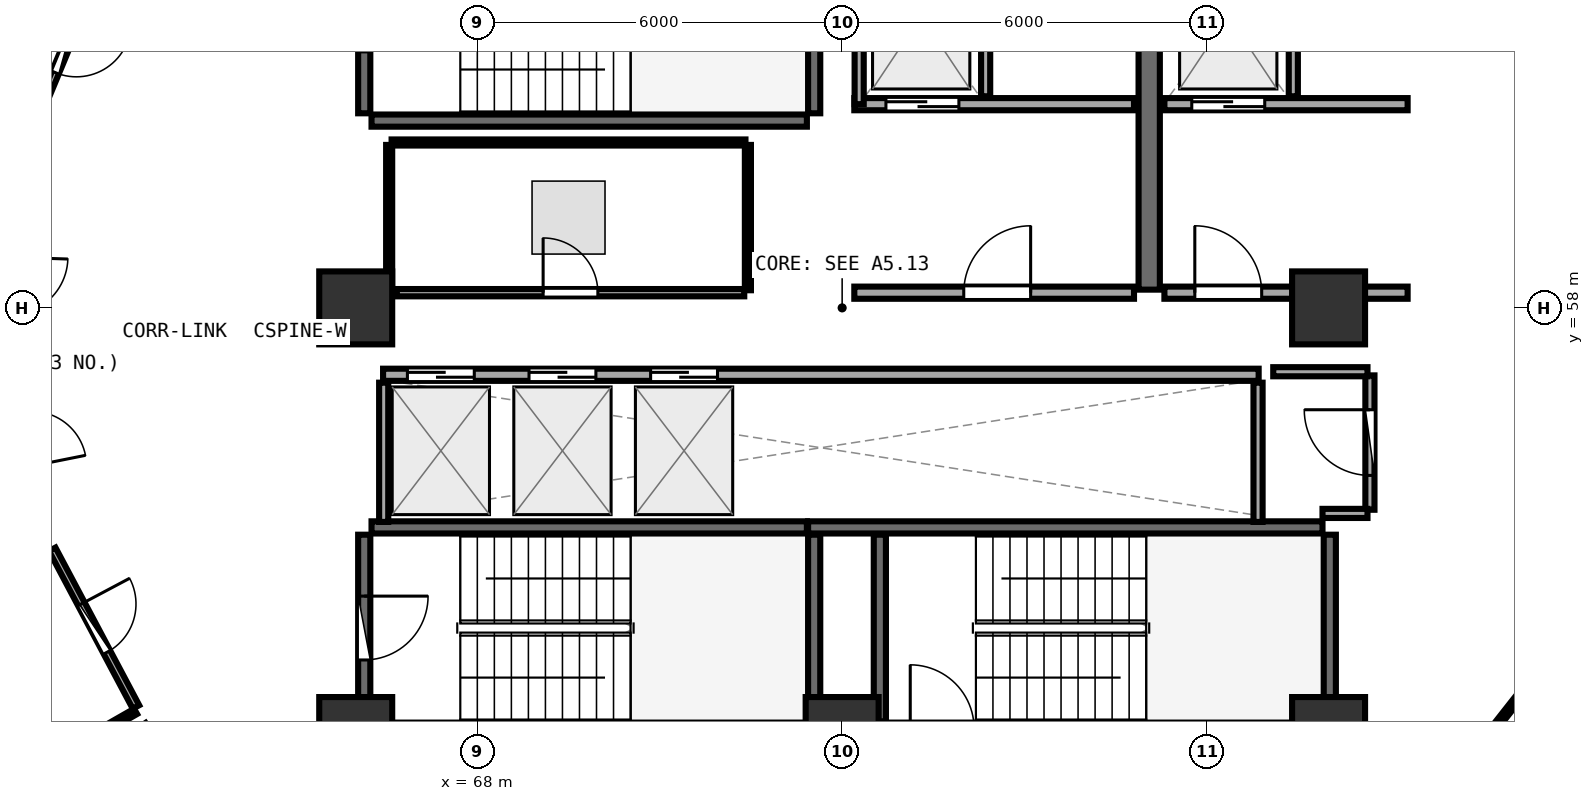
"""IFC4 building model, lengths in metres.
Left out: names, types, materials, properties, quantities, classifications, styles, units other than length and angle.
Written with IfcOpenShell. Run it as: python <this file> out.ifc"""

import sys

from ifc_helpers import new_model, si_unit, direction, frame, frame_2d, origin, origin_2d, place, context, subcontext, project, spatial, rectangle, extrude, element, fill, save


model = new_model("IFC4")
c1 = context("Model", 3, precision=1e-05, world=origin(), true_north=direction((0.0, 1.0)))
c2 = subcontext(c1, "Body", "Model", "MODEL_VIEW")
j1 = project(units=[si_unit("LENGTHUNIT", "METRE"), si_unit("PLANEANGLEUNIT", "RADIAN")], contexts=[c1])
p1 = place(None, origin())
s1 = spatial("IfcSite", under=j1, at=p1, CompositionType="ELEMENT")
p2 = place(p1, origin())
s2 = spatial("IfcBuilding", under=s1, at=p2, CompositionType="ELEMENT")
p3 = place(p2, frame((0.0, 0.0, 204.45)))
s3 = spatial("IfcBuildingStorey", under=s2, at=p3, CompositionType="ELEMENT", Elevation=204.45)
for number, where, z_axis, x_axis in (
    (1, (66.0, 51.0, 0.0), (0.0, 0.0, 1.0), (1.0, 0.0, 0.0)),
    (2, (74.0, 51.0, 0.0), (0.0, 0.0, 1.0), (1.0, 0.0, 0.0)),
    (3, (82.0, 51.0, 0.0), (0.0, 0.0, 1.0), (1.0, 0.0, 0.0)),
    (4, (82.0, 58.0, 0.0), (0.0, 0.0, 1.0), (1.0, 0.0, 0.0)),
    (5, (66.0, 58.0, 0.0), (0.0, 0.0, 1.0), (1.0, 0.0, 0.0)),
):
    element("IfcColumn", number, at=place(p3, frame(where, z_axis=z_axis, x_axis=x_axis)), inside=s3, PredefinedType="PILASTER", context=c2, shape_type="SweptSolid", body=[
        extrude(rectangle(XDim=1.2, YDim=1.2, at=origin_2d()), origin(), (0.0, 0.0, 1.0), 3.75),
    ])
p4 = place(p3, frame((66.26, 61.08, 0.0), z_axis=(0.0, 0.0, 1.0), x_axis=(1.0, 0.0, 0.0)))
e6 = element("IfcWall", 6, at=p4, inside=s3, PredefinedType="SHEAR", context=c2, shape_type="SweptSolid", body=[
    extrude(rectangle(XDim=7.16, YDim=0.2, at=frame_2d((3.58, 0.0))), origin(), (0.0, 0.0, 1.0), 3.49),
])
p5 = place(p3, frame((73.54, 61.2, 0.0), z_axis=(0.0, 0.0, 1.0), x_axis=(0.0, 1.0, 0.0)))
e7 = element("IfcWall", 7, at=p5, inside=s3, PredefinedType="SHEAR", context=c2, shape_type="SweptSolid", body=[
    extrude(rectangle(XDim=3.07, YDim=0.2, at=frame_2d((1.535, 0.0))), origin(), (0.0, 0.0, 1.0), 3.49),
])
p6 = place(p3, frame((66.14, 64.27, 0.0), z_axis=(0.0, 0.0, 1.0), x_axis=(0.0, -1.0, 0.0)))
e8 = element("IfcWall", 8, at=p6, inside=s3, PredefinedType="SHEAR", context=c2, shape_type="SweptSolid", body=[
    extrude(rectangle(XDim=3.07, YDim=0.2, at=frame_2d((1.535, 0.0))), origin(), (0.0, 0.0, 1.0), 3.49),
])
p7 = place(p6, frame((1.01, 0.0, 0.0)))
e9 = element("IfcOpeningElement", 9, at=p7, cuts=e8, PredefinedType="OPENING", context=c2, shape_type="SweptSolid", body=[
    extrude(rectangle(XDim=1.05, YDim=2.1, at=frame_2d((0.525, 1.05))), frame((0.0, 0.11, 0.0), z_axis=(0.0, -1.0, 0.0), x_axis=(1.0, 0.0, 0.0)), (0.0, 0.0, 1.0), 0.22),
])
p8 = place(p3, frame((82.02, 51.2, 0.0), z_axis=(0.0, 0.0, 1.0), x_axis=(0.0, 1.0, 0.0)))
e10 = element("IfcWall", 10, at=p8, inside=s3, PredefinedType="SHEAR", context=c2, shape_type="SweptSolid", body=[
    extrude(rectangle(XDim=3.07, YDim=0.2, at=frame_2d((1.535, 0.0))), origin(), (0.0, 0.0, 1.0), 3.49),
])
p9 = place(p3, frame((81.9, 54.39, 0.0), z_axis=(0.0, 0.0, 1.0), x_axis=(-1.0, 0.0, 0.0)))
e11 = element("IfcWall", 11, at=p9, inside=s3, PredefinedType="SHEAR", context=c2, shape_type="SweptSolid", body=[
    extrude(rectangle(XDim=8.46, YDim=0.2, at=frame_2d((4.23, 0.0))), origin(), (0.0, 0.0, 1.0), 3.49),
])
for number, where, z_axis, x_axis in (
    (12, (74.62, 54.27, 0.0), (0.0, 0.0, 1.0), (0.0, -1.0, 0.0)),
    (13, (73.54, 51.2, 0.0), (0.0, 0.0, 1.0), (0.0, 1.0, 0.0)),
):
    element("IfcWall", number, at=place(p3, frame(where, z_axis=z_axis, x_axis=x_axis)), inside=s3, PredefinedType="SHEAR", context=c2, shape_type="SweptSolid", body=[
        extrude(rectangle(XDim=3.07, YDim=0.2, at=frame_2d((1.535, 0.0))), origin(), (0.0, 0.0, 1.0), 3.49),
    ])
p10 = place(p3, frame((73.42, 54.39, 0.0), z_axis=(0.0, 0.0, 1.0), x_axis=(-1.0, 0.0, 0.0)))
e14 = element("IfcWall", 14, at=p10, inside=s3, PredefinedType="SHEAR", context=c2, shape_type="SweptSolid", body=[
    extrude(rectangle(XDim=7.16, YDim=0.2, at=frame_2d((3.58, 0.0))), origin(), (0.0, 0.0, 1.0), 3.49),
])
p11 = place(p3, frame((66.14, 54.27, 0.0), z_axis=(0.0, 0.0, 1.0), x_axis=(0.0, -1.0, 0.0)))
e15 = element("IfcWall", 15, at=p11, inside=s3, PredefinedType="SHEAR", context=c2, shape_type="SweptSolid", body=[
    extrude(rectangle(XDim=3.07, YDim=0.2, at=frame_2d((1.535, 0.0))), origin(), (0.0, 0.0, 1.0), 3.49),
])
p12 = place(p11, frame((1.01, 0.0, 0.0)))
e16 = element("IfcOpeningElement", 16, at=p12, cuts=e15, PredefinedType="OPENING", context=c2, shape_type="SweptSolid", body=[
    extrude(rectangle(XDim=1.05, YDim=2.1, at=frame_2d((0.525, 1.05))), frame((0.0, 0.11, 0.0), z_axis=(0.0, -1.0, 0.0), x_axis=(1.0, 0.0, 0.0)), (0.0, 0.0, 1.0), 0.22),
])
p13 = place(p3, frame((79.05, 58.3, 0.0), z_axis=(0.0, 0.0, 1.0), x_axis=(0.0, 1.0, 0.0)))
e17 = element("IfcWall", 17, at=p13, inside=s3, PredefinedType="SHEAR", context=c2, shape_type="SweptSolid", body=[
    extrude(rectangle(XDim=6.3, YDim=0.35, at=frame_2d((3.15, 0.0))), origin(), (0.0, 0.0, 1.0), 3.49),
])
p14 = place(p3, frame((74.2, 61.35, 0.0), z_axis=(0.0, 0.0, 1.0), x_axis=(1.0, 0.0, 0.0)))
e18 = element("IfcWall", 18, at=p14, inside=s3, PredefinedType="SOLIDWALL", context=c2, shape_type="SweptSolid", body=[
    extrude(rectangle(XDim=4.6, YDim=0.2, at=frame_2d((2.3, 0.0))), origin(), (0.0, 0.0, 1.0), 3.48),
])
p15 = place(p14, frame((0.52, 0.0, 0.0)))
e19 = element("IfcOpeningElement", 19, at=p15, cuts=e18, PredefinedType="OPENING", context=c2, shape_type="SweptSolid", body=[
    extrude(rectangle(XDim=1.2, YDim=2.15, at=frame_2d((0.6, 1.075))), frame((0.0, 0.11, 0.0), z_axis=(0.0, -1.0, 0.0), x_axis=(1.0, 0.0, 0.0)), (0.0, 0.0, 1.0), 0.22),
])
p16 = place(p3, frame((74.28, 61.35, 0.0), z_axis=(0.0, 0.0, 1.0), x_axis=(0.0, 1.0, 0.0)))
e20 = element("IfcWall", 20, at=p16, inside=s3, PredefinedType="PARTITIONING", context=c2, shape_type="SweptSolid", body=[
    extrude(rectangle(XDim=2.97, YDim=0.15, at=frame_2d((1.485, 0.0))), origin(), (0.0, 0.0, 1.0), 3.48),
])
p17 = place(p3, frame((76.36, 61.48, 0.0), z_axis=(0.0, 0.0, 1.0), x_axis=(0.0, 1.0, 0.0)))
e21 = element("IfcWall", 21, at=p17, inside=s3, PredefinedType="PARTITIONING", context=c2, shape_type="SweptSolid", body=[
    extrude(rectangle(XDim=2.84, YDim=0.15, at=frame_2d((1.42, 0.0))), origin(), (0.0, 0.0, 1.0), 3.48),
])
p18 = place(p3, frame((79.3, 61.35, 0.0), z_axis=(0.0, 0.0, 1.0), x_axis=(1.0, 0.0, 0.0)))
e22 = element("IfcWall", 22, at=p18, inside=s3, PredefinedType="SOLIDWALL", context=c2, shape_type="SweptSolid", body=[
    extrude(rectangle(XDim=4.0, YDim=0.2, at=frame_2d((2.0, 0.0))), origin(), (0.0, 0.0, 1.0), 2.775),
])
p19 = place(p18, frame((0.45, 0.0, 0.0)))
e23 = element("IfcOpeningElement", 23, at=p19, cuts=e22, PredefinedType="OPENING", context=c2, shape_type="SweptSolid", body=[
    extrude(rectangle(XDim=1.2, YDim=2.15, at=frame_2d((0.6, 1.075))), frame((0.0, 0.11, 0.0), z_axis=(0.0, -1.0, 0.0), x_axis=(1.0, 0.0, 0.0)), (0.0, 0.0, 1.0), 0.22),
])
p20 = place(p3, frame((81.42, 61.48, 0.0), z_axis=(0.0, 0.0, 1.0), x_axis=(0.0, 1.0, 0.0)))
e24 = element("IfcWall", 24, at=p20, inside=s3, PredefinedType="PARTITIONING", context=c2, shape_type="SweptSolid", body=[
    extrude(rectangle(XDim=2.84, YDim=0.15, at=frame_2d((1.42, 0.0))), origin(), (0.0, 0.0, 1.0), 3.48),
])
p21 = place(p3, frame((74.2, 58.25, 0.0), z_axis=(0.0, 0.0, 1.0), x_axis=(1.0, 0.0, 0.0)))
e25 = element("IfcWall", 25, at=p21, inside=s3, PredefinedType="SOLIDWALL", context=c2, shape_type="SweptSolid", body=[
    extrude(rectangle(XDim=4.6, YDim=0.2, at=frame_2d((2.3, 0.0))), origin(), (0.0, 0.0, 1.0), 3.48),
])
p22 = place(p21, frame((1.8, 0.0, 0.0)))
e26 = element("IfcOpeningElement", 26, at=p22, cuts=e25, PredefinedType="OPENING", context=c2, shape_type="SweptSolid", body=[
    extrude(rectangle(XDim=1.1, YDim=2.1, at=frame_2d((0.55, 1.05))), frame((0.0, 0.11, 0.0), z_axis=(0.0, -1.0, 0.0), x_axis=(1.0, 0.0, 0.0)), (0.0, 0.0, 1.0), 0.22),
])
p23 = place(p3, frame((79.3, 58.25, 0.0), z_axis=(0.0, 0.0, 1.0), x_axis=(1.0, 0.0, 0.0)))
e27 = element("IfcWall", 27, at=p23, inside=s3, PredefinedType="SOLIDWALL", context=c2, shape_type="SweptSolid", body=[
    extrude(rectangle(XDim=4.0, YDim=0.2, at=frame_2d((2.0, 0.0))), origin(), (0.0, 0.0, 1.0), 2.775),
])
p24 = place(p23, frame((0.5, 0.0, 0.0)))
e28 = element("IfcOpeningElement", 28, at=p24, cuts=e27, PredefinedType="OPENING", context=c2, shape_type="SweptSolid", body=[
    extrude(rectangle(XDim=1.1, YDim=2.1, at=frame_2d((0.55, 1.05))), frame((0.0, 0.11, 0.0), z_axis=(0.0, -1.0, 0.0), x_axis=(1.0, 0.0, 0.0)), (0.0, 0.0, 1.0), 0.22),
])
p25 = place(p3, frame((66.45, 56.9, 0.0), z_axis=(0.0, 0.0, 1.0), x_axis=(1.0, 0.0, 0.0)))
e29 = element("IfcWall", 29, at=p25, inside=s3, PredefinedType="SOLIDWALL", context=c2, shape_type="SweptSolid", body=[
    extrude(rectangle(XDim=14.4, YDim=0.2, at=frame_2d((7.2, 0.0))), origin(), (0.0, 0.0, 1.0), 3.48),
])
p26 = place(p25, frame((0.4, 0.0, 0.0)))
e30 = element("IfcOpeningElement", 30, at=p26, cuts=e29, PredefinedType="OPENING", context=c2, shape_type="SweptSolid", body=[
    extrude(rectangle(XDim=1.1, YDim=2.1, at=frame_2d((0.55, 1.05))), frame((0.0, 0.11, 0.0), z_axis=(0.0, -1.0, 0.0), x_axis=(1.0, 0.0, 0.0)), (0.0, 0.0, 1.0), 0.22),
])
p27 = place(p25, frame((2.4, 0.0, 0.0)))
e31 = element("IfcOpeningElement", 31, at=p27, cuts=e29, PredefinedType="OPENING", context=c2, shape_type="SweptSolid", body=[
    extrude(rectangle(XDim=1.1, YDim=2.1, at=frame_2d((0.55, 1.05))), frame((0.0, 0.11, 0.0), z_axis=(0.0, -1.0, 0.0), x_axis=(1.0, 0.0, 0.0)), (0.0, 0.0, 1.0), 0.22),
])
p28 = place(p25, frame((4.4, 0.0, 0.0)))
e32 = element("IfcOpeningElement", 32, at=p28, cuts=e29, PredefinedType="OPENING", context=c2, shape_type="SweptSolid", body=[
    extrude(rectangle(XDim=1.1, YDim=2.1, at=frame_2d((0.55, 1.05))), frame((0.0, 0.11, 0.0), z_axis=(0.0, -1.0, 0.0), x_axis=(1.0, 0.0, 0.0)), (0.0, 0.0, 1.0), 0.22),
])
for number, where, z_axis, x_axis in (
    (33, (66.46, 54.48, 0.0), (0.0, 0.0, 1.0), (0.0, 1.0, 0.0)),
    (34, (80.84, 54.48, 0.0), (0.0, 0.0, 1.0), (0.0, 1.0, 0.0)),
):
    element("IfcWall", number, at=place(p3, frame(where, z_axis=z_axis, x_axis=x_axis)), inside=s3, PredefinedType="PARTITIONING", context=c2, shape_type="SweptSolid", body=[
        extrude(rectangle(XDim=2.29, YDim=0.15, at=frame_2d((1.145, 0.0))), origin(), (0.0, 0.0, 1.0), 3.48),
    ])
p29 = place(p3, frame((82.68, 54.68, 0.0), z_axis=(0.0, 0.0, 1.0), x_axis=(0.0, 1.0, 0.0)))
e35 = element("IfcWall", 35, at=p29, inside=s3, PredefinedType="PARTITIONING", context=c2, shape_type="SweptSolid", body=[
    extrude(rectangle(XDim=2.21, YDim=0.15, at=frame_2d((1.105, 0.0))), origin(), (0.0, 0.0, 1.0), 3.48),
])
p30 = place(p29, frame((0.565, 0.0, 0.0)))
e36 = element("IfcOpeningElement", 36, at=p30, cuts=e35, PredefinedType="OPENING", context=c2, shape_type="SweptSolid", body=[
    extrude(rectangle(XDim=1.08, YDim=2.1, at=frame_2d((0.54, 1.05))), frame((0.0, 0.085, 0.0), z_axis=(0.0, -1.0, 0.0), x_axis=(1.0, 0.0, 0.0)), (0.0, 0.0, 1.0), 0.17),
])
p31 = place(p3, frame((66.675, 58.25, 0.0), z_axis=(0.0, 0.0, 1.0), x_axis=(1.0, 0.0, 0.0)))
e37 = element("IfcWall", 37, at=p31, inside=s3, PredefinedType="PARTITIONING", context=c2, shape_type="SweptSolid", body=[
    extrude(rectangle(XDim=5.715, YDim=0.12, at=frame_2d((2.857, 0.0))), origin(), (0.0, 0.0, 1.0), 3.48),
])
p32 = place(p31, frame((2.407, 0.0, 0.0)))
e38 = element("IfcOpeningElement", 38, at=p32, cuts=e37, PredefinedType="OPENING", context=c2, shape_type="SweptSolid", body=[
    extrude(rectangle(XDim=0.9, YDim=2.08, at=frame_2d((0.45, 1.04))), frame((0.0, 0.07, 0.0), z_axis=(0.0, -1.0, 0.0), x_axis=(1.0, 0.0, 0.0)), (0.0, 0.0, 1.0), 0.14),
])
p33 = place(p3, frame((61.793, 63.629, 0.0), z_axis=(0.0, 0.0, 1.0), x_axis=(-0.384145151494, -0.923272713007, 0.0)))
e39 = element("IfcWall", 39, at=p33, inside=s3, PredefinedType="PARTITIONING", context=c2, shape_type="SweptSolid", body=[
    extrude(rectangle(XDim=2.913, YDim=0.12, at=frame_2d((1.456, 0.0))), origin(), (0.0, 0.0, 1.0), 3.235),
])
p34 = place(p33, frame((1.006, 0.0, 0.0)))
e40 = element("IfcOpeningElement", 40, at=p34, cuts=e39, PredefinedType="OPENING", context=c2, shape_type="SweptSolid", body=[
    extrude(rectangle(XDim=0.9, YDim=2.08, at=frame_2d((0.45, 1.04))), frame((0.0, 0.07, 0.0), z_axis=(0.0, -1.0, 0.0), x_axis=(1.0, 0.0, 0.0)), (0.0, 0.0, 1.0), 0.14),
])
p35 = place(p3, frame((61.009, 54.03, 0.0), z_axis=(0.0, 0.0, 1.0), x_axis=(0.468999166779, -0.883198608219, 0.0)))
e41 = element("IfcWall", 41, at=p35, inside=s3, PredefinedType="PARTITIONING", context=c2, shape_type="SweptSolid", body=[
    extrude(rectangle(XDim=2.936, YDim=0.12, at=frame_2d((1.468, 0.0))), origin(), (0.0, 0.0, 1.0), 3.235),
])
p36 = place(p35, frame((1.018, 0.0, 0.0)))
e42 = element("IfcOpeningElement", 42, at=p36, cuts=e41, PredefinedType="OPENING", context=c2, shape_type="SweptSolid", body=[
    extrude(rectangle(XDim=0.9, YDim=2.08, at=frame_2d((0.45, 1.04))), frame((0.0, 0.07, 0.0), z_axis=(0.0, -1.0, 0.0), x_axis=(1.0, 0.0, 0.0)), (0.0, 0.0, 1.0), 0.14),
])
p37 = place(p3, frame((81.9, 54.62, 0.0), z_axis=(0.0, 0.0, 1.0), x_axis=(1.0, 0.0, 0.0)))
e43 = element("IfcWall", 43, at=p37, inside=s3, PredefinedType="PARTITIONING", context=c2, shape_type="SweptSolid", body=[
    extrude(rectangle(XDim=0.74, YDim=0.15, at=frame_2d((0.37, 0.0))), origin(), (0.0, 0.0, 1.0), 2.775),
])
p38 = place(p3, frame((82.64, 56.95, 0.0), z_axis=(0.0, 0.0, 1.0), x_axis=(-1.0, 0.0, 0.0)))
e44 = element("IfcWall", 44, at=p38, inside=s3, PredefinedType="PARTITIONING", context=c2, shape_type="SweptSolid", body=[
    extrude(rectangle(XDim=1.55, YDim=0.15, at=frame_2d((0.775, 0.0))), origin(), (0.0, 0.0, 1.0), 2.775),
])
p39 = place(p3, frame((72.45, 58.29, 0.0), z_axis=(0.0, 0.0, 1.0), x_axis=(0.0, 1.0, 0.0)))
e45 = element("IfcWall", 45, at=p39, inside=s3, PredefinedType="PARTITIONING", context=c2, shape_type="SweptSolid", body=[
    extrude(rectangle(XDim=2.39, YDim=0.1, at=frame_2d((1.195, 0.0))), origin(), (0.0, 0.0, 1.0), 3.48),
])
p40 = place(p3, frame((72.41, 60.72, 0.0), z_axis=(0.0, 0.0, 1.0), x_axis=(-1.0, 0.0, 0.0)))
e46 = element("IfcWall", 46, at=p40, inside=s3, PredefinedType="PARTITIONING", context=c2, shape_type="SweptSolid", body=[
    extrude(rectangle(XDim=5.82, YDim=0.1, at=frame_2d((2.91, 0.0))), origin(), (0.0, 0.0, 1.0), 3.48),
])
p41 = place(p3, frame((66.55, 60.68, 0.0), z_axis=(0.0, 0.0, 1.0), x_axis=(0.0, -1.0, 0.0)))
e47 = element("IfcWall", 47, at=p41, inside=s3, PredefinedType="PARTITIONING", context=c2, shape_type="SweptSolid", body=[
    extrude(rectangle(XDim=2.383, YDim=0.1, at=frame_2d((1.191, 0.0))), origin(), (0.0, 0.0, 1.0), 3.48),
])
p42 = place(p3, frame((82.628, 48.422, 0.0), z_axis=(0.0, 0.0, 1.0), x_axis=(0.618431543907, 0.785838676511, 0.0)))
e48 = element("IfcWall", 48, at=p42, inside=s3, PredefinedType="PARTITIONING", context=c2, shape_type="SweptSolid", body=[
    extrude(rectangle(XDim=6.962, YDim=0.1, at=frame_2d((3.481, 0.0))), origin(), (0.0, 0.0, 1.0), 3.025),
])
p43 = place(p3, frame((87.302, 61.018, 0.0), z_axis=(0.0, 0.0, 1.0), x_axis=(-0.497477595841, 0.867476824841, 0.0)))
e49 = element("IfcWall", 49, at=p43, inside=s3, PredefinedType="PARTITIONING", context=c2, shape_type="SweptSolid", body=[
    extrude(rectangle(XDim=5.713, YDim=0.1, at=frame_2d((2.856, 0.0))), origin(), (0.0, 0.0, 1.0), 3.025),
])
p44 = place(p3, frame((62.379, 51.364, 0.0), z_axis=(0.0, 0.0, 1.0), x_axis=(-0.868127220156, -0.496341746808, 0.0)))
e50 = element("IfcWall", 50, at=p44, inside=s3, PredefinedType="PARTITIONING", context=c2, shape_type="SweptSolid", body=[
    extrude(rectangle(XDim=7.648, YDim=0.1, at=frame_2d((3.824, 0.0))), origin(), (0.0, 0.0, 1.0), 3.025),
])
p45 = place(p12, origin())
e51 = element("IfcDoor", 51, at=p45, inside=s3, OperationType="SINGLE_SWING_LEFT", PredefinedType="DOOR", context=c2, shape_type="SweptSolid", body=[
    extrude(rectangle(XDim=1.05, YDim=2.1, at=frame_2d((0.525, 1.05))), frame((0.0, 0.025, 0.0), z_axis=(0.0, -1.0, 0.0), x_axis=(1.0, 0.0, 0.0)), (0.0, 0.0, 1.0), 0.05),
])
fill(e16, e51)
p46 = place(p15, origin())
e52 = element("IfcDoor", 52, at=p46, inside=s3, OperationType="DOUBLE_DOOR_SLIDING", PredefinedType="DOOR", context=c2, shape_type="SweptSolid", body=[
    extrude(rectangle(XDim=1.2, YDim=2.15, at=frame_2d((0.6, 1.075))), frame((0.0, 0.025, 0.0), z_axis=(0.0, -1.0, 0.0), x_axis=(1.0, 0.0, 0.0)), (0.0, 0.0, 1.0), 0.05),
])
fill(e19, e52)
p47 = place(p19, origin())
e53 = element("IfcDoor", 53, at=p47, inside=s3, OperationType="DOUBLE_DOOR_SLIDING", PredefinedType="DOOR", context=c2, shape_type="SweptSolid", body=[
    extrude(rectangle(XDim=1.2, YDim=2.15, at=frame_2d((0.6, 1.075))), frame((0.0, 0.025, 0.0), z_axis=(0.0, -1.0, 0.0), x_axis=(1.0, 0.0, 0.0)), (0.0, 0.0, 1.0), 0.05),
])
fill(e23, e53)
p48 = place(p22, frame((1.1, 0.0, 0.0), z_axis=(0.0, 0.0, 1.0), x_axis=(-1.0, 0.0, 0.0)))
e54 = element("IfcDoor", 54, at=p48, inside=s3, OperationType="SINGLE_SWING_LEFT", PredefinedType="DOOR", context=c2, shape_type="SweptSolid", body=[
    extrude(rectangle(XDim=1.1, YDim=2.1, at=frame_2d((0.55, 1.05))), frame((0.0, 0.025, 0.0), z_axis=(0.0, -1.0, 0.0), x_axis=(1.0, 0.0, 0.0)), (0.0, 0.0, 1.0), 0.05),
])
fill(e26, e54)
p49 = place(p24, frame((1.1, 0.0, 0.0), z_axis=(0.0, 0.0, 1.0), x_axis=(-1.0, 0.0, 0.0)))
e55 = element("IfcDoor", 55, at=p49, inside=s3, OperationType="SINGLE_SWING_RIGHT", PredefinedType="DOOR", context=c2, shape_type="SweptSolid", body=[
    extrude(rectangle(XDim=1.1, YDim=2.1, at=frame_2d((0.55, 1.05))), frame((0.0, 0.025, 0.0), z_axis=(0.0, -1.0, 0.0), x_axis=(1.0, 0.0, 0.0)), (0.0, 0.0, 1.0), 0.05),
])
fill(e28, e55)
p50 = place(p26, origin())
e56 = element("IfcDoor", 56, at=p50, inside=s3, OperationType="DOUBLE_DOOR_SLIDING", PredefinedType="DOOR", context=c2, shape_type="SweptSolid", body=[
    extrude(rectangle(XDim=1.1, YDim=2.1, at=frame_2d((0.55, 1.05))), frame((0.0, 0.025, 0.0), z_axis=(0.0, -1.0, 0.0), x_axis=(1.0, 0.0, 0.0)), (0.0, 0.0, 1.0), 0.05),
])
fill(e30, e56)
p51 = place(p27, origin())
e57 = element("IfcDoor", 57, at=p51, inside=s3, OperationType="DOUBLE_DOOR_SLIDING", PredefinedType="DOOR", context=c2, shape_type="SweptSolid", body=[
    extrude(rectangle(XDim=1.1, YDim=2.1, at=frame_2d((0.55, 1.05))), frame((0.0, 0.025, 0.0), z_axis=(0.0, -1.0, 0.0), x_axis=(1.0, 0.0, 0.0)), (0.0, 0.0, 1.0), 0.05),
])
fill(e31, e57)
p52 = place(p28, origin())
e58 = element("IfcDoor", 58, at=p52, inside=s3, OperationType="DOUBLE_DOOR_SLIDING", PredefinedType="DOOR", context=c2, shape_type="SweptSolid", body=[
    extrude(rectangle(XDim=1.1, YDim=2.1, at=frame_2d((0.55, 1.05))), frame((0.0, 0.025, 0.0), z_axis=(0.0, -1.0, 0.0), x_axis=(1.0, 0.0, 0.0)), (0.0, 0.0, 1.0), 0.05),
])
fill(e32, e58)
p53 = place(p30, origin())
e59 = element("IfcDoor", 59, at=p53, inside=s3, OperationType="SINGLE_SWING_RIGHT", PredefinedType="DOOR", context=c2, shape_type="SweptSolid", body=[
    extrude(rectangle(XDim=1.08, YDim=2.1, at=frame_2d((0.54, 1.05))), frame((0.0, 0.025, 0.0), z_axis=(0.0, -1.0, 0.0), x_axis=(1.0, 0.0, 0.0)), (0.0, 0.0, 1.0), 0.05),
])
fill(e36, e59)
p54 = place(p32, origin())
e60 = element("IfcDoor", 60, at=p54, inside=s3, OperationType="SINGLE_SWING_LEFT", PredefinedType="DOOR", context=c2, shape_type="SweptSolid", body=[
    extrude(rectangle(XDim=0.9, YDim=2.08, at=frame_2d((0.45, 1.04))), frame((0.0, 0.025, 0.0), z_axis=(0.0, -1.0, 0.0), x_axis=(1.0, 0.0, 0.0)), (0.0, 0.0, 1.0), 0.05),
])
fill(e38, e60)
p55 = place(p34, origin())
e61 = element("IfcDoor", 61, at=p55, inside=s3, OperationType="SINGLE_SWING_LEFT", PredefinedType="DOOR", context=c2, shape_type="SweptSolid", body=[
    extrude(rectangle(XDim=0.9, YDim=2.08, at=frame_2d((0.45, 1.04))), frame((0.0, 0.025, 0.0), z_axis=(0.0, -1.0, 0.0), x_axis=(1.0, 0.0, 0.0)), (0.0, 0.0, 1.0), 0.05),
])
fill(e40, e61)
p56 = place(p36, origin())
e62 = element("IfcDoor", 62, at=p56, inside=s3, OperationType="SINGLE_SWING_LEFT", PredefinedType="DOOR", context=c2, shape_type="SweptSolid", body=[
    extrude(rectangle(XDim=0.9, YDim=2.08, at=frame_2d((0.45, 1.04))), frame((0.0, 0.025, 0.0), z_axis=(0.0, -1.0, 0.0), x_axis=(1.0, 0.0, 0.0)), (0.0, 0.0, 1.0), 0.05),
])
fill(e42, e62)
save(model, sys.argv[1])
